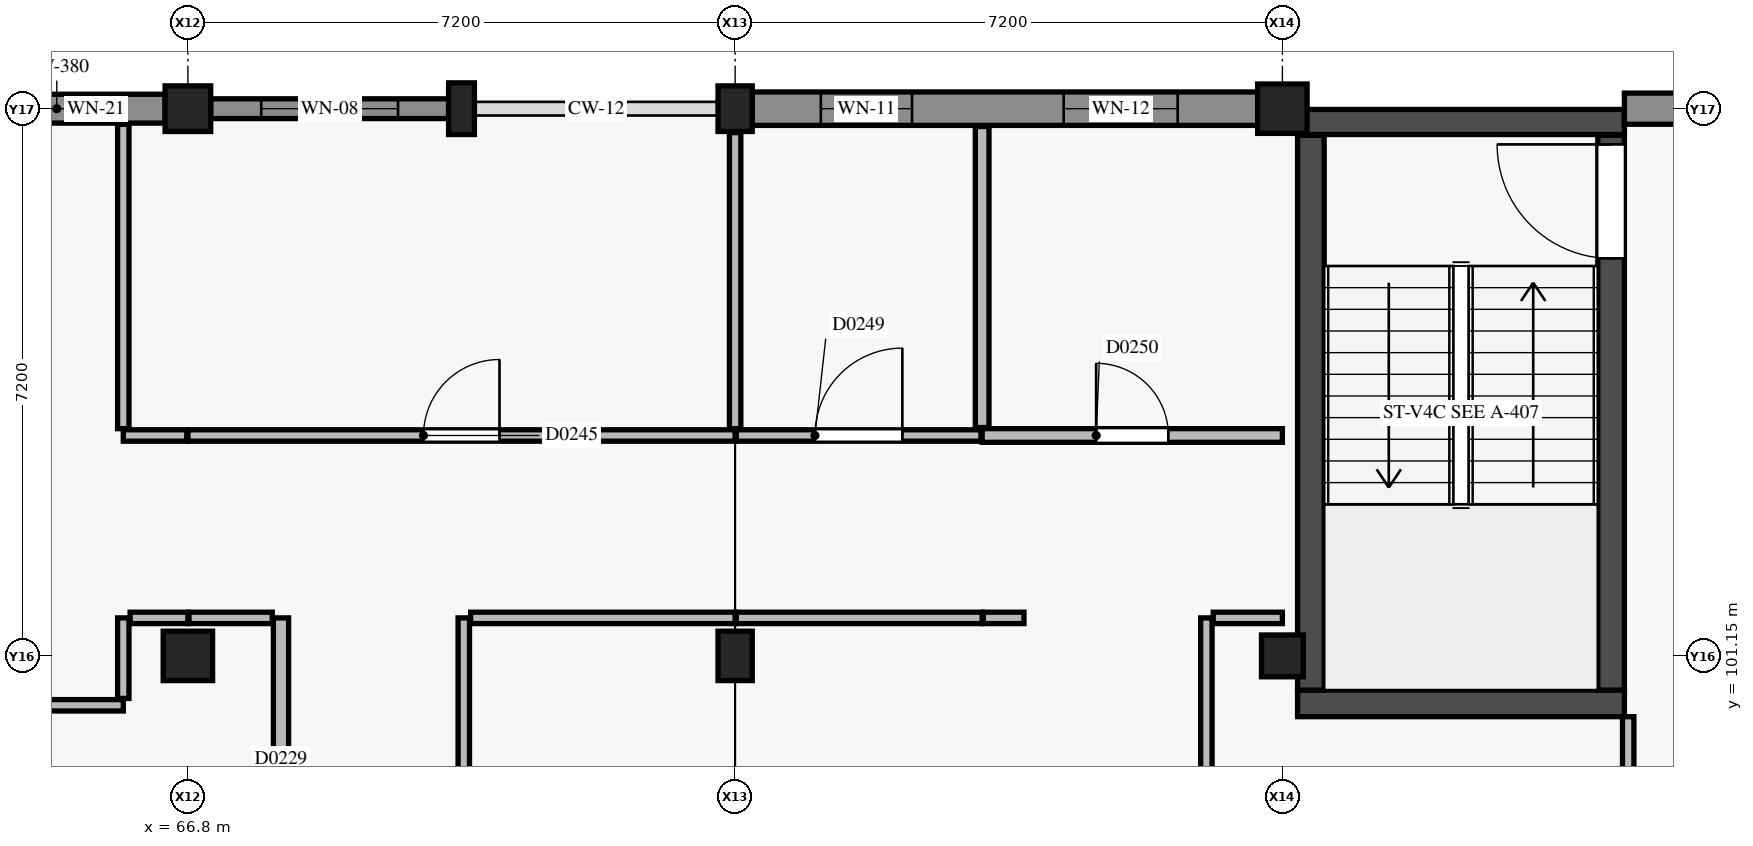
"""IFC4 building model, lengths in metres.
Left out: names, types, materials, properties, quantities, classifications, styles, units other than length and angle.
Written with IfcOpenShell. Run it as: python <this file> out.ifc"""

import sys

from ifc_helpers import new_model, si_unit, direction, frame, frame_2d, origin, origin_2d, place, context, subcontext, project, spatial, rectangle, circle, extrude, element, fill, save


model = new_model("IFC4")
c1 = context("Model", 3, precision=1e-05, world=origin(), true_north=direction((0.0, 1.0)))
c2 = subcontext(c1, "Body", "Model", "MODEL_VIEW")
j1 = project(units=[si_unit("LENGTHUNIT", "METRE"), si_unit("PLANEANGLEUNIT", "RADIAN")], contexts=[c1])
p1 = place(None, origin())
s1 = spatial("IfcSite", under=j1, at=p1, CompositionType="ELEMENT")
p2 = place(p1, origin())
s2 = spatial("IfcBuilding", under=s1, at=p2, CompositionType="ELEMENT")
p3 = place(p2, frame((0.0, 0.0, 9.0)))
s3 = spatial("IfcBuildingStorey", under=s2, at=p3, CompositionType="ELEMENT", Elevation=9.0)
p4 = place(p3, frame((66.8, 101.15, 0.0), z_axis=(0.0, 0.0, 1.0), x_axis=(1.0, 0.0, 0.0)))
e1 = element("IfcColumn", 1, at=p4, inside=s3, PredefinedType="COLUMN", context=c2, shape_type="SweptSolid", body=[
    extrude(rectangle(XDim=0.65, YDim=0.65, at=origin_2d()), origin(), (0.0, 0.0, 1.0), 4.2),
])
p5 = place(p3, frame((66.8, 108.35, 0.0), z_axis=(0.0, 0.0, 1.0), x_axis=(1.0, 0.0, 0.0)))
e2 = element("IfcColumn", 2, at=p5, inside=s3, PredefinedType="COLUMN", context=c2, shape_type="SweptSolid", body=[
    extrude(rectangle(XDim=0.6, YDim=0.6, at=origin_2d()), origin(), (0.0, 0.0, 1.0), 4.2),
])
p6 = place(p3, frame((74.0, 101.15, 0.0), z_axis=(0.0, 0.0, 1.0), x_axis=(1.0, 0.0, 0.0)))
e3 = element("IfcColumn", 3, at=p6, inside=s3, PredefinedType="COLUMN", context=c2, shape_type="SweptSolid", body=[
    extrude(rectangle(XDim=0.45, YDim=0.65, at=origin_2d()), origin(), (0.0, 0.0, 1.0), 4.2),
])
p7 = place(p3, frame((74.0, 108.35, 0.0), z_axis=(0.0, 0.0, 1.0), x_axis=(1.0, 0.0, 0.0)))
e4 = element("IfcColumn", 4, at=p7, inside=s3, PredefinedType="COLUMN", context=c2, shape_type="SweptSolid", body=[
    extrude(rectangle(XDim=0.45, YDim=0.6, at=origin_2d()), origin(), (0.0, 0.0, 1.0), 4.2),
])
p8 = place(p3, frame((81.2, 101.15, 0.0), z_axis=(0.0, 0.0, 1.0), x_axis=(1.0, 0.0, 0.0)))
e5 = element("IfcColumn", 5, at=p8, inside=s3, PredefinedType="COLUMN", context=c2, shape_type="SweptSolid", body=[
    extrude(rectangle(XDim=0.55, YDim=0.55, at=origin_2d()), origin(), (0.0, 0.0, 1.0), 4.2),
])
p9 = place(p3, frame((81.2, 108.35, 0.0), z_axis=(0.0, 0.0, 1.0), x_axis=(1.0, 0.0, 0.0)))
e6 = element("IfcColumn", 6, at=p9, inside=s3, PredefinedType="COLUMN", context=c2, shape_type="SweptSolid", body=[
    extrude(circle(Radius=0.325, at=origin_2d()), origin(), (0.0, 0.0, 1.0), 4.2),
])
p10 = place(p3, frame((70.4, 108.35, 0.0), z_axis=(0.0, 0.0, 1.0), x_axis=(1.0, 0.0, 0.0)))
e7 = element("IfcColumn", 7, at=p10, inside=s3, PredefinedType="PILASTER", context=c2, shape_type="SweptSolid", body=[
    extrude(rectangle(XDim=0.34, YDim=0.68, at=origin_2d()), origin(), (0.0, 0.0, 1.0), 4.2),
])
p11 = place(p3, frame((81.4, 100.525, 0.0), z_axis=(0.0, 0.0, 1.0), x_axis=(1.0, 0.0, 0.0)))
e8 = element("IfcWall", 8, at=p11, inside=s3, PredefinedType="SHEAR", context=c2, shape_type="SweptSolid", body=[
    extrude(rectangle(XDim=4.3, YDim=0.35, at=frame_2d((2.15, 0.0))), origin(), (0.0, 0.0, 1.0), 3.95),
])
p12 = place(p3, frame((81.4, 108.175, 0.0), z_axis=(0.0, 0.0, 1.0), x_axis=(1.0, 0.0, 0.0)))
e9 = element("IfcWall", 9, at=p12, inside=s3, PredefinedType="SHEAR", context=c2, shape_type="SweptSolid", body=[
    extrude(rectangle(XDim=4.3, YDim=0.33, at=frame_2d((2.15, 0.0))), origin(), (0.0, 0.0, 1.0), 3.95),
])
p13 = place(p3, frame((81.575, 100.7, 0.0), z_axis=(0.0, 0.0, 1.0), x_axis=(0.0, 1.0, 0.0)))
e10 = element("IfcWall", 10, at=p13, inside=s3, PredefinedType="SHEAR", context=c2, shape_type="SweptSolid", body=[
    extrude(rectangle(XDim=7.3, YDim=0.35, at=frame_2d((3.65, 0.0))), origin(), (0.0, 0.0, 1.0), 3.95),
])
p14 = place(p3, frame((85.525, 100.7, 0.0), z_axis=(0.0, 0.0, 1.0), x_axis=(0.0, 1.0, 0.0)))
e11 = element("IfcWall", 11, at=p14, inside=s3, PredefinedType="SHEAR", context=c2, shape_type="SweptSolid", body=[
    extrude(rectangle(XDim=7.3, YDim=0.35, at=frame_2d((3.65, 0.0))), origin(), (0.0, 0.0, 1.0), 3.95),
])
p15 = place(p14, frame((5.68, 0.0, 0.0)))
e12 = element("IfcOpeningElement", 12, at=p15, cuts=e11, PredefinedType="OPENING", context=c2, shape_type="SweptSolid", body=[
    extrude(rectangle(XDim=1.5, YDim=2.15, at=frame_2d((0.75, 1.075))), frame((0.0, 0.185, 0.0), z_axis=(0.0, -1.0, 0.0), x_axis=(1.0, 0.0, 0.0)), (0.0, 0.0, 1.0), 0.37),
])
p16 = place(p3, frame((63.65, 108.35, 0.0), z_axis=(0.0, 0.0, 1.0), x_axis=(1.0, 0.0, 0.0)))
e13 = element("IfcWall", 13, at=p16, inside=s3, PredefinedType="USERDEFINED", context=c2, shape_type="SweptSolid", body=[
    extrude(rectangle(XDim=2.85, YDim=0.38, at=frame_2d((1.425, 0.0))), origin(), (0.0, 0.0, 1.0), 3.13),
])
p17 = place(p16, frame((0.69, 0.0, 0.95)))
e14 = element("IfcOpeningElement", 14, at=p17, cuts=e13, PredefinedType="OPENING", context=c2, shape_type="SweptSolid", body=[
    extrude(rectangle(XDim=0.9, YDim=1.2, at=frame_2d((0.45, 0.6))), frame((0.0, 0.2, 0.0), z_axis=(0.0, -1.0, 0.0), x_axis=(1.0, 0.0, 0.0)), (0.0, 0.0, 1.0), 0.4),
])
p18 = place(p3, frame((67.1, 108.35, 0.0), z_axis=(0.0, 0.0, 1.0), x_axis=(1.0, 0.0, 0.0)))
e15 = element("IfcWall", 15, at=p18, inside=s3, PredefinedType="SOLIDWALL", context=c2, shape_type="SweptSolid", body=[
    extrude(rectangle(XDim=3.13, YDim=0.26, at=frame_2d((1.565, 0.0))), origin(), (0.0, 0.0, 1.0), 3.13),
])
p19 = place(p18, frame((0.665, 0.0, 0.9)))
e16 = element("IfcOpeningElement", 16, at=p19, cuts=e15, PredefinedType="OPENING", context=c2, shape_type="SweptSolid", body=[
    extrude(rectangle(XDim=1.8, YDim=1.8, at=frame_2d((0.9, 0.9))), frame((0.0, 0.14, 0.0), z_axis=(0.0, -1.0, 0.0), x_axis=(1.0, 0.0, 0.0)), (0.0, 0.0, 1.0), 0.28),
])
p20 = place(p3, frame((74.225, 108.35, 0.0), z_axis=(0.0, 0.0, 1.0), x_axis=(1.0, 0.0, 0.0)))
e17 = element("IfcWall", 17, at=p20, inside=s3, PredefinedType="USERDEFINED", context=c2, shape_type="SweptSolid", body=[
    extrude(rectangle(XDim=6.65, YDim=0.44, at=frame_2d((3.325, 0.0))), origin(), (0.0, 0.0, 1.0), 3.13),
])
p21 = place(p20, frame((0.903, 0.0, 0.9)))
e18 = element("IfcOpeningElement", 18, at=p21, cuts=e17, PredefinedType="OPENING", context=c2, shape_type="SweptSolid", body=[
    extrude(rectangle(XDim=1.2, YDim=1.5, at=frame_2d((0.6, 0.75))), frame((0.0, 0.23, 0.0), z_axis=(0.0, -1.0, 0.0), x_axis=(1.0, 0.0, 0.0)), (0.0, 0.0, 1.0), 0.46),
])
p22 = place(p20, frame((4.097, 0.0, 0.9)))
e19 = element("IfcOpeningElement", 19, at=p22, cuts=e17, PredefinedType="OPENING", context=c2, shape_type="SweptSolid", body=[
    extrude(rectangle(XDim=1.5, YDim=1.5, at=frame_2d((0.75, 0.75))), frame((0.0, 0.23, 0.0), z_axis=(0.0, -1.0, 0.0), x_axis=(1.0, 0.0, 0.0)), (0.0, 0.0, 1.0), 0.46),
])
p23 = place(p3, frame((85.7, 108.35, 0.0), z_axis=(0.0, 0.0, 1.0), x_axis=(1.0, 0.0, 0.0)))
e20 = element("IfcWall", 20, at=p23, inside=s3, PredefinedType="USERDEFINED", context=c2, shape_type="SweptSolid", body=[
    extrude(rectangle(XDim=2.325, YDim=0.41, at=frame_2d((1.163, 0.0))), origin(), (0.0, 0.0, 1.0), 3.13),
])
p24 = place(p23, frame((0.712, 0.0, 0.95)))
e21 = element("IfcOpeningElement", 21, at=p24, cuts=e20, PredefinedType="OPENING", context=c2, shape_type="SweptSolid", body=[
    extrude(rectangle(XDim=0.9, YDim=1.2, at=frame_2d((0.45, 0.6))), frame((0.0, 0.215, 0.0), z_axis=(0.0, -1.0, 0.0), x_axis=(1.0, 0.0, 0.0)), (0.0, 0.0, 1.0), 0.43),
])
p25 = place(p3, frame((68.025, 95.85, 0.0), z_axis=(0.0, 0.0, 1.0), x_axis=(0.0, 1.0, 0.0)))
e22 = element("IfcWall", 22, at=p25, inside=s3, PredefinedType="PARTITIONING", context=c2, shape_type="SweptSolid", body=[
    extrude(rectangle(XDim=5.8, YDim=0.2, at=frame_2d((2.9, 0.0))), origin(), (0.0, 0.0, 1.0), 3.285),
])
p26 = place(p25, frame((1.496, 0.0, 0.0)))
e23 = element("IfcOpeningElement", 23, at=p26, cuts=e22, PredefinedType="OPENING", context=c2, shape_type="SweptSolid", body=[
    extrude(rectangle(XDim=1.4, YDim=2.2, at=frame_2d((0.7, 1.1))), frame((0.0, 0.11, 0.0), z_axis=(0.0, -1.0, 0.0), x_axis=(1.0, 0.0, 0.0)), (0.0, 0.0, 1.0), 0.22),
])
p27 = place(p3, frame((77.25, 104.05, 0.0), z_axis=(0.0, 0.0, 1.0), x_axis=(1.0, 0.0, 0.0)))
e24 = element("IfcWall", 24, at=p27, inside=s3, PredefinedType="PLUMBINGWALL", context=c2, shape_type="SweptSolid", body=[
    extrude(rectangle(XDim=3.95, YDim=0.18, at=frame_2d((1.975, 0.0))), origin(), (0.0, 0.0, 1.0), 3.285),
])
p28 = place(p27, frame((1.5, 0.0, 0.0)))
e25 = element("IfcOpeningElement", 25, at=p28, cuts=e24, PredefinedType="OPENING", context=c2, shape_type="SweptSolid", body=[
    extrude(rectangle(XDim=0.95, YDim=2.1, at=frame_2d((0.475, 1.05))), frame((0.0, 0.1, 0.0), z_axis=(0.0, -1.0, 0.0), x_axis=(1.0, 0.0, 0.0)), (0.0, 0.0, 1.0), 0.2),
])
p29 = place(p3, frame((70.43, 94.49, 0.0), z_axis=(0.0, 0.0, 1.0), x_axis=(0.0, 1.0, 0.0)))
e26 = element("IfcWall", 26, at=p29, inside=s3, PredefinedType="PARTITIONING", context=c2, shape_type="SweptSolid", body=[
    extrude(rectangle(XDim=7.16, YDim=0.15, at=frame_2d((3.58, 0.0))), origin(), (0.0, 0.0, 1.0), 3.285),
])
p30 = place(p3, frame((70.52, 101.65, 0.0), z_axis=(0.0, 0.0, 1.0), x_axis=(1.0, 0.0, 0.0)))
e27 = element("IfcWall", 27, at=p30, inside=s3, PredefinedType="PARTITIONING", context=c2, shape_type="SweptSolid", body=[
    extrude(rectangle(XDim=3.48, YDim=0.15, at=frame_2d((1.74, 0.0))), origin(), (0.0, 0.0, 1.0), 3.135),
])
p31 = place(p3, frame((74.015, 101.65, 0.0), z_axis=(0.0, 0.0, 1.0), x_axis=(1.0, 0.0, 0.0)))
e28 = element("IfcWall", 28, at=p31, inside=s3, PredefinedType="PARTITIONING", context=c2, shape_type="SweptSolid", body=[
    extrude(rectangle(XDim=3.235, YDim=0.15, at=frame_2d((1.618, 0.0))), origin(), (0.0, 0.0, 1.0), 3.135),
])
p32 = place(p3, frame((77.265, 101.65, 0.0), z_axis=(0.0, 0.0, 1.0), x_axis=(1.0, 0.0, 0.0)))
e29 = element("IfcWall", 29, at=p32, inside=s3, PredefinedType="PARTITIONING", context=c2, shape_type="SweptSolid", body=[
    extrude(rectangle(XDim=0.535, YDim=0.15, at=frame_2d((0.268, 0.0))), origin(), (0.0, 0.0, 1.0), 3.95),
])
p33 = place(p3, frame((85.75, 91.55, 0.0), z_axis=(0.0, 0.0, 1.0), x_axis=(0.0, 1.0, 0.0)))
e30 = element("IfcWall", 30, at=p33, inside=s3, PredefinedType="PARTITIONING", context=c2, shape_type="SweptSolid", body=[
    extrude(rectangle(XDim=8.8, YDim=0.15, at=frame_2d((4.4, 0.0))), origin(), (0.0, 0.0, 1.0), 3.455),
])
p34 = place(p3, frame((80.2, 91.64, 0.0), z_axis=(0.0, 0.0, 1.0), x_axis=(0.0, 1.0, 0.0)))
e31 = element("IfcWall", 31, at=p34, inside=s3, PredefinedType="PARTITIONING", context=c2, shape_type="SweptSolid", body=[
    extrude(rectangle(XDim=10.01, YDim=0.15, at=frame_2d((5.005, 0.0))), origin(), (0.0, 0.0, 1.0), 3.285),
])
p35 = place(p34, frame((4.43, 0.0, 0.0)))
e32 = element("IfcOpeningElement", 32, at=p35, cuts=e31, PredefinedType="OPENING", context=c2, shape_type="SweptSolid", body=[
    extrude(rectangle(XDim=1.15, YDim=2.15, at=frame_2d((0.575, 1.075))), frame((0.0, 0.085, 0.0), z_axis=(0.0, -1.0, 0.0), x_axis=(1.0, 0.0, 0.0)), (0.0, 0.0, 1.0), 0.17),
])
p36 = place(p3, frame((80.29, 101.65, 0.0), z_axis=(0.0, 0.0, 1.0), x_axis=(1.0, 0.0, 0.0)))
e33 = element("IfcWall", 33, at=p36, inside=s3, PredefinedType="PARTITIONING", context=c2, shape_type="SweptSolid", body=[
    extrude(rectangle(XDim=0.91, YDim=0.15, at=frame_2d((0.455, 0.0))), origin(), (0.0, 0.0, 1.0), 3.285),
])
p37 = place(p3, frame((66.8, 104.05, 0.0), z_axis=(0.0, 0.0, 1.0), x_axis=(1.0, 0.0, 0.0)))
e34 = element("IfcWall", 34, at=p37, inside=s3, PredefinedType="PARTITIONING", context=c2, shape_type="SweptSolid", body=[
    extrude(rectangle(XDim=7.2, YDim=0.15, at=frame_2d((3.6, 0.0))), origin(), (0.0, 0.0, 1.0), 3.135),
])
p38 = place(p37, frame((3.1, 0.0, 0.0)))
e35 = element("IfcOpeningElement", 35, at=p38, cuts=e34, PredefinedType="OPENING", context=c2, shape_type="SweptSolid", body=[
    extrude(rectangle(XDim=1.0, YDim=2.15, at=frame_2d((0.5, 1.075))), frame((0.0, 0.085, 0.0), z_axis=(0.0, -1.0, 0.0), x_axis=(1.0, 0.0, 0.0)), (0.0, 0.0, 1.0), 0.17),
])
p39 = place(p3, frame((65.95, 104.05, 0.0), z_axis=(0.0, 0.0, 1.0), x_axis=(1.0, 0.0, 0.0)))
e36 = element("IfcWall", 36, at=p39, inside=s3, PredefinedType="PARTITIONING", context=c2, shape_type="SweptSolid", body=[
    extrude(rectangle(XDim=0.835, YDim=0.15, at=frame_2d((0.417, 0.0))), origin(), (0.0, 0.0, 1.0), 3.285),
])
p40 = place(p3, frame((65.95, 104.14, 0.0), z_axis=(0.0, 0.0, 1.0), x_axis=(0.0, 1.0, 0.0)))
e37 = element("IfcWall", 37, at=p40, inside=s3, PredefinedType="PARTITIONING", context=c2, shape_type="SweptSolid", body=[
    extrude(rectangle(XDim=4.005, YDim=0.15, at=frame_2d((2.002, 0.0))), origin(), (0.0, 0.0, 1.0), 3.95),
])
p41 = place(p3, frame((63.665, 100.5, 0.0), z_axis=(0.0, 0.0, 1.0), x_axis=(1.0, 0.0, 0.0)))
e38 = element("IfcWall", 38, at=p41, inside=s3, PredefinedType="PARTITIONING", context=c2, shape_type="SweptSolid", body=[
    extrude(rectangle(XDim=2.285, YDim=0.15, at=frame_2d((1.143, 0.0))), origin(), (0.0, 0.0, 1.0), 3.95),
])
p42 = place(p3, frame((65.95, 100.59, 0.0), z_axis=(0.0, 0.0, 1.0), x_axis=(0.0, 1.0, 0.0)))
e39 = element("IfcWall", 39, at=p42, inside=s3, PredefinedType="PARTITIONING", context=c2, shape_type="SweptSolid", body=[
    extrude(rectangle(XDim=1.06, YDim=0.15, at=frame_2d((0.53, 0.0))), origin(), (0.0, 0.0, 1.0), 3.95),
])
p43 = place(p3, frame((66.04, 101.65, 0.0), z_axis=(0.0, 0.0, 1.0), x_axis=(1.0, 0.0, 0.0)))
e40 = element("IfcWall", 40, at=p43, inside=s3, PredefinedType="PARTITIONING", context=c2, shape_type="SweptSolid", body=[
    extrude(rectangle(XDim=0.76, YDim=0.15, at=frame_2d((0.38, 0.0))), origin(), (0.0, 0.0, 1.0), 3.285),
])
p44 = place(p3, frame((66.815, 101.65, 0.0), z_axis=(0.0, 0.0, 1.0), x_axis=(1.0, 0.0, 0.0)))
e41 = element("IfcWall", 41, at=p44, inside=s3, PredefinedType="PARTITIONING", context=c2, shape_type="SweptSolid", body=[
    extrude(rectangle(XDim=1.095, YDim=0.15, at=frame_2d((0.547, 0.0))), origin(), (0.0, 0.0, 1.0), 3.285),
])
p45 = place(p3, frame((74.015, 104.05, 0.0), z_axis=(0.0, 0.0, 1.0), x_axis=(1.0, 0.0, 0.0)))
e42 = element("IfcWall", 42, at=p45, inside=s3, PredefinedType="PARTITIONING", context=c2, shape_type="SweptSolid", body=[
    extrude(rectangle(XDim=3.22, YDim=0.15, at=frame_2d((1.61, 0.0))), origin(), (0.0, 0.0, 1.0), 3.135),
])
p46 = place(p45, frame((1.035, 0.0, 0.0)))
e43 = element("IfcOpeningElement", 43, at=p46, cuts=e42, PredefinedType="OPENING", context=c2, shape_type="SweptSolid", body=[
    extrude(rectangle(XDim=1.15, YDim=2.15, at=frame_2d((0.575, 1.075))), frame((0.0, 0.085, 0.0), z_axis=(0.0, -1.0, 0.0), x_axis=(1.0, 0.0, 0.0)), (0.0, 0.0, 1.0), 0.17),
])
p47 = place(p3, frame((77.25, 104.155, 0.0), z_axis=(0.0, 0.0, 1.0), x_axis=(0.0, 1.0, 0.0)))
e44 = element("IfcWall", 44, at=p47, inside=s3, PredefinedType="PLUMBINGWALL", context=c2, shape_type="SweptSolid", body=[
    extrude(rectangle(XDim=3.96, YDim=0.18, at=frame_2d((1.98, 0.0))), origin(), (0.0, 0.0, 1.0), 3.515),
])
p48 = place(p3, frame((74.0, 104.14, 0.0), z_axis=(0.0, 0.0, 1.0), x_axis=(0.0, 1.0, 0.0)))
e45 = element("IfcWall", 45, at=p48, inside=s3, PredefinedType="PARTITIONING", context=c2, shape_type="SweptSolid", body=[
    extrude(rectangle(XDim=3.895, YDim=0.15, at=frame_2d((1.948, 0.0))), origin(), (0.0, 0.0, 1.0), 3.135),
])
p49 = place(p17, origin())
e46 = element("IfcWindow", 46, at=p49, inside=s3, PartitioningType="SINGLE_PANEL", PredefinedType="WINDOW", context=c2, shape_type="SweptSolid", body=[
    extrude(rectangle(XDim=0.9, YDim=1.2, at=frame_2d((0.45, 0.6))), frame((0.0, 0.03, 0.0), z_axis=(0.0, -1.0, 0.0), x_axis=(1.0, 0.0, 0.0)), (0.0, 0.0, 1.0), 0.06),
])
fill(e14, e46)
p50 = place(p19, origin())
e47 = element("IfcWindow", 47, at=p50, inside=s3, PartitioningType="SINGLE_PANEL", PredefinedType="WINDOW", context=c2, shape_type="SweptSolid", body=[
    extrude(rectangle(XDim=1.8, YDim=1.8, at=frame_2d((0.9, 0.9))), frame((0.0, 0.03, 0.0), z_axis=(0.0, -1.0, 0.0), x_axis=(1.0, 0.0, 0.0)), (0.0, 0.0, 1.0), 0.06),
])
fill(e16, e47)
p51 = place(p21, origin())
e48 = element("IfcWindow", 48, at=p51, inside=s3, PartitioningType="SINGLE_PANEL", PredefinedType="WINDOW", context=c2, shape_type="SweptSolid", body=[
    extrude(rectangle(XDim=1.2, YDim=1.5, at=frame_2d((0.6, 0.75))), frame((0.0, 0.03, 0.0), z_axis=(0.0, -1.0, 0.0), x_axis=(1.0, 0.0, 0.0)), (0.0, 0.0, 1.0), 0.06),
])
fill(e18, e48)
p52 = place(p22, origin())
e49 = element("IfcWindow", 49, at=p52, inside=s3, PartitioningType="SINGLE_PANEL", PredefinedType="WINDOW", context=c2, shape_type="SweptSolid", body=[
    extrude(rectangle(XDim=1.5, YDim=1.5, at=frame_2d((0.75, 0.75))), frame((0.0, 0.03, 0.0), z_axis=(0.0, -1.0, 0.0), x_axis=(1.0, 0.0, 0.0)), (0.0, 0.0, 1.0), 0.06),
])
fill(e19, e49)
p53 = place(p15, origin())
e50 = element("IfcDoor", 50, at=p53, inside=s3, OperationType="SINGLE_SWING_RIGHT", PredefinedType="DOOR", context=c2, shape_type="SweptSolid", body=[
    extrude(rectangle(XDim=1.5, YDim=2.15, at=frame_2d((0.75, 1.075))), frame((0.0, 0.025, 0.0), z_axis=(0.0, -1.0, 0.0), x_axis=(1.0, 0.0, 0.0)), (0.0, 0.0, 1.0), 0.05),
])
fill(e12, e50)
p54 = place(p38, origin())
e51 = element("IfcDoor", 51, at=p54, inside=s3, OperationType="SINGLE_SWING_RIGHT", PredefinedType="DOOR", context=c2, shape_type="SweptSolid", body=[
    extrude(rectangle(XDim=1.0, YDim=2.15, at=frame_2d((0.5, 1.075))), frame((0.0, 0.025, 0.0), z_axis=(0.0, -1.0, 0.0), x_axis=(1.0, 0.0, 0.0)), (0.0, 0.0, 1.0), 0.05),
])
fill(e35, e51)
p55 = place(p46, origin())
e52 = element("IfcDoor", 52, at=p55, inside=s3, OperationType="SINGLE_SWING_RIGHT", PredefinedType="DOOR", context=c2, shape_type="SweptSolid", body=[
    extrude(rectangle(XDim=1.15, YDim=2.15, at=frame_2d((0.575, 1.075))), frame((0.0, 0.025, 0.0), z_axis=(0.0, -1.0, 0.0), x_axis=(1.0, 0.0, 0.0)), (0.0, 0.0, 1.0), 0.05),
])
fill(e43, e52)
p56 = place(p28, origin())
e53 = element("IfcDoor", 53, at=p56, inside=s3, OperationType="SINGLE_SWING_LEFT", PredefinedType="DOOR", context=c2, shape_type="SweptSolid", body=[
    extrude(rectangle(XDim=0.95, YDim=2.1, at=frame_2d((0.475, 1.05))), frame((0.0, 0.025, 0.0), z_axis=(0.0, -1.0, 0.0), x_axis=(1.0, 0.0, 0.0)), (0.0, 0.0, 1.0), 0.05),
])
fill(e25, e53)
save(model, sys.argv[1])
